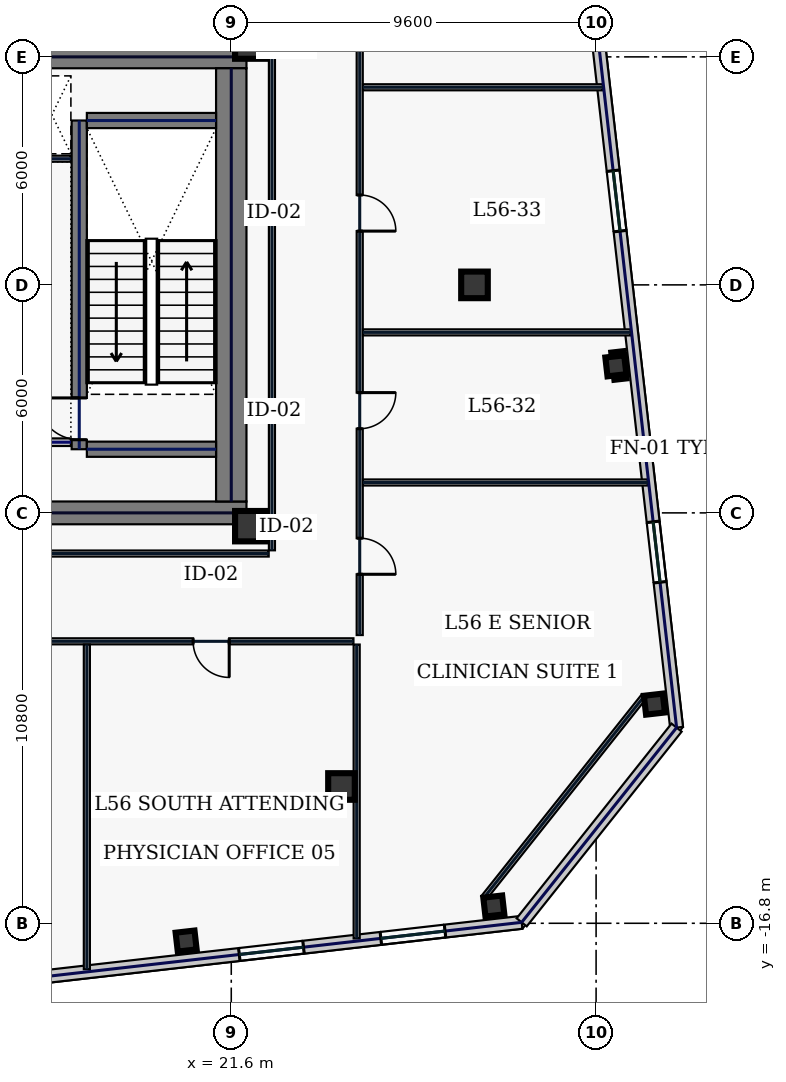
"""IFC4 building model, lengths in metres.
Left out: names, types, materials, properties, quantities, classifications, styles, units other than length and angle.
Written with IfcOpenShell. Run it as: python <this file> out.ifc"""

import sys

from ifc_helpers import new_model, si_unit, direction, frame, frame_2d, origin, origin_2d, place, context, subcontext, project, spatial, rectangle, hollow_rectangle, extrude, element, fill, save


model = new_model("IFC4")
c1 = context("Model", 3, precision=1e-05, world=origin(), true_north=direction((0.0, 1.0)))
c2 = subcontext(c1, "Body", "Model", "MODEL_VIEW")
j1 = project(units=[si_unit("LENGTHUNIT", "METRE"), si_unit("PLANEANGLEUNIT", "RADIAN")], contexts=[c1])
p1 = place(None, origin())
s1 = spatial("IfcSite", under=j1, at=p1, CompositionType="ELEMENT")
p2 = place(p1, origin())
s2 = spatial("IfcBuilding", under=s1, at=p2, CompositionType="ELEMENT")
p3 = place(p2, frame((0.0, 0.0, 243.0)))
s3 = spatial("IfcBuildingStorey", under=s2, at=p3, CompositionType="ELEMENT", Elevation=243.0)
for number, where, z_axis, x_axis in (
    (1, (10.5, 6.0, 0.0), (0.0, 0.0, 1.0), (1.0, 0.0, 0.0)),
    (2, (10.5, -6.0, 0.0), (0.0, 0.0, 1.0), (1.0, 0.0, 0.0)),
):
    element("IfcWall", number, at=place(p3, frame(where, z_axis=z_axis, x_axis=x_axis)), inside=s3, PredefinedType="SHEAR", context=c2, shape_type="SweptSolid", body=[
        extrude(rectangle(XDim=11.5, YDim=0.6, at=frame_2d((5.75, 0.0))), origin(), (0.0, 0.0, 1.0), 3.74),
    ])
p4 = place(p3, frame((21.6, -5.7, 0.0), z_axis=(0.0, 0.0, 1.0), x_axis=(0.0, 1.0, 0.0)))
e3 = element("IfcWall", 3, at=p4, inside=s3, PredefinedType="SHEAR", context=c2, shape_type="SweptSolid", body=[
    extrude(rectangle(XDim=11.4, YDim=0.8, at=frame_2d((5.7, 0.0))), origin(), (0.0, 0.0, 1.0), 3.74),
])
p5 = place(p3, frame((17.6, -4.325, 0.0), z_axis=(0.0, 0.0, 1.0), x_axis=(0.0, 1.0, 0.0)))
e4 = element("IfcWall", 4, at=p5, inside=s3, PredefinedType="SHEAR", context=c2, shape_type="SweptSolid", body=[
    extrude(rectangle(XDim=8.65, YDim=0.4, at=frame_2d((4.325, 0.0))), origin(), (0.0, 0.0, 1.0), 3.74),
])
p6 = place(p5, frame((0.25, 0.0, 0.0)))
e5 = element("IfcOpeningElement", 5, at=p6, cuts=e4, PredefinedType="OPENING", context=c2, shape_type="SweptSolid", body=[
    extrude(rectangle(XDim=1.1, YDim=2.2, at=frame_2d((0.55, 1.1))), frame((0.0, 0.21, 0.0), z_axis=(0.0, -1.0, 0.0), x_axis=(1.0, 0.0, 0.0)), (0.0, 0.0, 1.0), 0.42),
])
for number, where, z_axis, x_axis in (
    (6, (17.8, -4.325, 0.0), (0.0, 0.0, 1.0), (1.0, 0.0, 0.0)),
    (7, (17.8, 4.325, 0.0), (0.0, 0.0, 1.0), (1.0, 0.0, 0.0)),
):
    element("IfcWall", number, at=place(p3, frame(where, z_axis=z_axis, x_axis=x_axis)), inside=s3, PredefinedType="SHEAR", context=c2, shape_type="SweptSolid", body=[
        extrude(rectangle(XDim=3.4, YDim=0.4, at=frame_2d((1.7, 0.0))), origin(), (0.0, 0.0, 1.0), 3.74),
    ])
for number, where, z_axis, x_axis in (
    (8, (22.1, -6.35, 0.0), (0.0, 0.0, 1.0), (1.0, 0.0, 0.0)),
    (9, (22.1, 6.35, 0.0), (0.0, 0.0, 1.0), (1.0, 0.0, 0.0)),
):
    element("IfcColumn", number, at=place(p3, frame(where, z_axis=z_axis, x_axis=x_axis)), inside=s3, PredefinedType="COLUMN", context=c2, shape_type="SweptSolid", body=[
        extrude(hollow_rectangle(XDim=0.8, YDim=0.8, WallThickness=0.036, at=origin_2d()), origin(), (0.0, 0.0, 1.0), 3.74),
    ])
for number, where, z_axis, x_axis in (
    (10, (24.5, -13.2, 0.0), (0.0, 0.0, 1.0), (1.0, 0.0, 0.0)),
    (11, (28.0, 0.0, 0.0), (0.0, 0.0, 1.0), (1.0, 0.0, 0.0)),
):
    element("IfcColumn", number, at=place(p3, frame(where, z_axis=z_axis, x_axis=x_axis)), inside=s3, PredefinedType="COLUMN", context=c2, shape_type="SweptSolid", body=[
        extrude(hollow_rectangle(XDim=0.7, YDim=0.7, WallThickness=0.032, at=origin_2d()), origin(), (0.0, 0.0, 1.0), 3.74),
    ])
for number, where, z_axis, x_axis in (
    (12, (20.412, -17.268, 0.0), (0.0, 0.0, 1.0), (0.994, 0.113, 0.0)),
    (13, (28.509, -16.345, 0.0), (0.0, 0.0, 1.0), (0.994, 0.113, 0.0)),
    (14, (32.734, -11.033, 0.0), (0.0, 0.0, 1.0), (0.994, 0.113, 0.0)),
    (15, (31.72, -2.131, 0.0), (0.0, 0.0, 1.0), (0.994, 0.113, 0.0)),
):
    element("IfcColumn", number, at=place(p3, frame(where, z_axis=z_axis, x_axis=x_axis)), inside=s3, PredefinedType="COLUMN", context=c2, shape_type="SweptSolid", body=[
        extrude(hollow_rectangle(XDim=0.5, YDim=0.5, WallThickness=0.025, at=origin_2d()), origin(), (0.0, 0.0, 1.0), 3.74),
    ])
p7 = place(p3, frame((10.71, -18.886, 0.0), z_axis=(0.0, 0.0, 1.0), x_axis=(0.993572271362, 0.113199565282, 0.0)))
e16 = element("IfcWall", 16, at=p7, inside=s3, PredefinedType="STANDARD", context=c2, shape_type="SweptSolid", body=[
    extrude(rectangle(XDim=18.651, YDim=0.34, at=frame_2d((9.326, 0.0))), origin(), (0.0, 0.0, 1.0), 3.74),
])
p8 = place(p7, frame((3.024, 0.0, 0.88)))
e17 = element("IfcOpeningElement", 17, at=p8, cuts=e16, PredefinedType="OPENING", context=c2, shape_type="SweptSolid", body=[
    extrude(rectangle(XDim=1.7, YDim=1.95, at=frame_2d((0.85, 0.975))), frame((0.0, 0.18, 0.0), z_axis=(0.0, -1.0, 0.0), x_axis=(1.0, 0.0, 0.0)), (0.0, 0.0, 1.0), 0.36),
])
p9 = place(p7, frame((11.173, 0.0, 0.88)))
e18 = element("IfcOpeningElement", 18, at=p9, cuts=e16, PredefinedType="OPENING", context=c2, shape_type="SweptSolid", body=[
    extrude(rectangle(XDim=1.7, YDim=1.95, at=frame_2d((0.85, 0.975))), frame((0.0, 0.18, 0.0), z_axis=(0.0, -1.0, 0.0), x_axis=(1.0, 0.0, 0.0)), (0.0, 0.0, 1.0), 0.36),
])
p10 = place(p7, frame((14.921, 0.0, 0.88)))
e19 = element("IfcOpeningElement", 19, at=p10, cuts=e16, PredefinedType="OPENING", context=c2, shape_type="SweptSolid", body=[
    extrude(rectangle(XDim=1.7, YDim=1.95, at=frame_2d((0.85, 0.975))), frame((0.0, 0.18, 0.0), z_axis=(0.0, -1.0, 0.0), x_axis=(1.0, 0.0, 0.0)), (0.0, 0.0, 1.0), 0.36),
])
p11 = place(p3, frame((33.318, -11.651, 0.0), z_axis=(0.0, 0.0, 1.0), x_axis=(-0.11320360501, 0.9935718111, 0.0)))
e20 = element("IfcWall", 20, at=p11, inside=s3, PredefinedType="STANDARD", context=c2, shape_type="SweptSolid", body=[
    extrude(rectangle(XDim=37.2, YDim=0.34, at=frame_2d((18.6, 0.0))), origin(), (0.0, 0.0, 1.0), 3.74),
])
p12 = place(p11, frame((3.85, 0.0, 0.58)))
e21 = element("IfcOpeningElement", 21, at=p12, cuts=e20, PredefinedType="OPENING", context=c2, shape_type="SweptSolid", body=[
    extrude(rectangle(XDim=1.6, YDim=2.3, at=frame_2d((0.8, 1.15))), frame((0.0, 0.18, 0.0), z_axis=(0.0, -1.0, 0.0), x_axis=(1.0, 0.0, 0.0)), (0.0, 0.0, 1.0), 0.36),
])
p13 = place(p11, frame((13.15, 0.0, 0.58)))
e22 = element("IfcOpeningElement", 22, at=p13, cuts=e20, PredefinedType="OPENING", context=c2, shape_type="SweptSolid", body=[
    extrude(rectangle(XDim=1.6, YDim=2.3, at=frame_2d((0.8, 1.15))), frame((0.0, 0.18, 0.0), z_axis=(0.0, -1.0, 0.0), x_axis=(1.0, 0.0, 0.0)), (0.0, 0.0, 1.0), 0.36),
])
p14 = place(p11, frame((22.45, 0.0, 0.58)))
e23 = element("IfcOpeningElement", 23, at=p14, cuts=e20, PredefinedType="OPENING", context=c2, shape_type="SweptSolid", body=[
    extrude(rectangle(XDim=1.6, YDim=2.3, at=frame_2d((0.8, 1.15))), frame((0.0, 0.18, 0.0), z_axis=(0.0, -1.0, 0.0), x_axis=(1.0, 0.0, 0.0)), (0.0, 0.0, 1.0), 0.36),
])
p15 = place(p11, frame((31.75, 0.0, 0.58)))
e24 = element("IfcOpeningElement", 24, at=p15, cuts=e20, PredefinedType="OPENING", context=c2, shape_type="SweptSolid", body=[
    extrude(rectangle(XDim=1.6, YDim=2.3, at=frame_2d((0.8, 1.15))), frame((0.0, 0.18, 0.0), z_axis=(0.0, -1.0, 0.0), x_axis=(1.0, 0.0, 0.0)), (0.0, 0.0, 1.0), 0.36),
])
p16 = place(p3, frame((29.242, -16.775, 0.0), z_axis=(0.0, 0.0, 1.0), x_axis=(0.62252823689, 0.78259733853, 0.0)))
e25 = element("IfcWall", 25, at=p16, inside=s3, PredefinedType="STANDARD", context=c2, shape_type="SweptSolid", body=[
    extrude(rectangle(XDim=6.548, YDim=0.34, at=frame_2d((3.274, 0.0))), origin(), (0.0, 0.0, 1.0), 3.74),
])
p17 = place(p3, frame((15.725, 3.32, 0.0), z_axis=(0.0, 0.0, 1.0), x_axis=(1.0, 0.0, 0.0)))
e26 = element("IfcWall", 26, at=p17, inside=s3, PredefinedType="PARTITIONING", context=c2, shape_type="SweptSolid", body=[
    extrude(rectangle(XDim=1.655, YDim=0.16, at=frame_2d((0.827, 0.0))), origin(), (0.0, 0.0, 1.0), 3.74),
])
p18 = place(p3, frame((14.825, -4.14, 0.0), z_axis=(0.0, 0.0, 1.0), x_axis=(1.0, 0.0, 0.0)))
e27 = element("IfcWall", 27, at=p18, inside=s3, PredefinedType="SOLIDWALL", context=c2, shape_type="SweptSolid", body=[
    extrude(rectangle(XDim=2.555, YDim=0.2, at=frame_2d((1.277, 0.0))), origin(), (0.0, 0.0, 1.0), 3.74),
])
p19 = place(p18, frame((0.88, 0.0, 0.0)))
e28 = element("IfcOpeningElement", 28, at=p19, cuts=e27, PredefinedType="OPENING", context=c2, shape_type="SweptSolid", body=[
    extrude(rectangle(XDim=0.95, YDim=2.2, at=frame_2d((0.475, 1.1))), frame((0.0, 0.11, 0.0), z_axis=(0.0, -1.0, 0.0), x_axis=(1.0, 0.0, 0.0)), (0.0, 0.0, 1.0), 0.22),
])
p20 = place(p3, frame((28.242, -16.134, 0.0), z_axis=(0.0, 0.0, 1.0), x_axis=(0.622521563328, 0.782602647064, 0.0)))
e29 = element("IfcWall", 29, at=p20, inside=s3, PredefinedType="PARTITIONING", context=c2, shape_type="SweptSolid", body=[
    extrude(rectangle(XDim=6.788, YDim=0.16, at=frame_2d((3.394, 0.0))), origin(), (0.0, 0.0, 1.0), 3.74),
])
p21 = place(p3, frame((24.98, 9.415, 0.0), z_axis=(0.0, 0.0, 1.0), x_axis=(0.0, -1.0, 0.0)))
e30 = element("IfcWall", 30, at=p21, inside=s3, PredefinedType="PARTITIONING", context=c2, shape_type="SweptSolid", body=[
    extrude(rectangle(XDim=18.63, YDim=0.16, at=frame_2d((9.315, 0.0))), origin(), (0.0, 0.0, 1.0), 3.74),
])
p22 = place(p21, frame((16.081, 0.0, 0.0)))
e31 = element("IfcOpeningElement", 31, at=p22, cuts=e30, PredefinedType="OPENING", context=c2, shape_type="SweptSolid", body=[
    extrude(rectangle(XDim=0.95, YDim=2.2, at=frame_2d((0.475, 1.1))), frame((0.0, 0.09, 0.0), z_axis=(0.0, -1.0, 0.0), x_axis=(1.0, 0.0, 0.0)), (0.0, 0.0, 1.0), 0.18),
])
p23 = place(p21, frame((12.25, 0.0, 0.0)))
e32 = element("IfcOpeningElement", 32, at=p23, cuts=e30, PredefinedType="OPENING", context=c2, shape_type="SweptSolid", body=[
    extrude(rectangle(XDim=0.95, YDim=2.2, at=frame_2d((0.475, 1.1))), frame((0.0, 0.09, 0.0), z_axis=(0.0, -1.0, 0.0), x_axis=(1.0, 0.0, 0.0)), (0.0, 0.0, 1.0), 0.18),
])
p24 = place(p21, frame((7.05, 0.0, 0.0)))
e33 = element("IfcOpeningElement", 33, at=p24, cuts=e30, PredefinedType="OPENING", context=c2, shape_type="SweptSolid", body=[
    extrude(rectangle(XDim=0.95, YDim=2.2, at=frame_2d((0.475, 1.1))), frame((0.0, 0.09, 0.0), z_axis=(0.0, -1.0, 0.0), x_axis=(1.0, 0.0, 0.0)), (0.0, 0.0, 1.0), 0.18),
])
p25 = place(p21, frame((1.869, 0.0, 0.0)))
e34 = element("IfcOpeningElement", 34, at=p25, cuts=e30, PredefinedType="OPENING", context=c2, shape_type="SweptSolid", body=[
    extrude(rectangle(XDim=0.95, YDim=2.2, at=frame_2d((0.475, 1.1))), frame((0.0, 0.09, 0.0), z_axis=(0.0, -1.0, 0.0), x_axis=(1.0, 0.0, 0.0)), (0.0, 0.0, 1.0), 0.18),
])
p26 = place(p3, frame((24.815, -9.38, 0.0), z_axis=(0.0, 0.0, 1.0), x_axis=(-1.0, 0.0, 0.0)))
e35 = element("IfcWall", 35, at=p26, inside=s3, PredefinedType="PARTITIONING", context=c2, shape_type="SweptSolid", body=[
    extrude(rectangle(XDim=37.35, YDim=0.16, at=frame_2d((18.675, 0.0))), origin(), (0.0, 0.0, 1.0), 3.74),
])
p27 = place(p26, frame((29.535, 0.0, 0.0)))
e36 = element("IfcOpeningElement", 36, at=p27, cuts=e35, PredefinedType="OPENING", context=c2, shape_type="SweptSolid", body=[
    extrude(rectangle(XDim=0.95, YDim=2.2, at=frame_2d((0.475, 1.1))), frame((0.0, 0.09, 0.0), z_axis=(0.0, -1.0, 0.0), x_axis=(1.0, 0.0, 0.0)), (0.0, 0.0, 1.0), 0.18),
])
p28 = place(p26, frame((22.435, 0.0, 0.0)))
e37 = element("IfcOpeningElement", 37, at=p28, cuts=e35, PredefinedType="OPENING", context=c2, shape_type="SweptSolid", body=[
    extrude(rectangle(XDim=0.95, YDim=2.2, at=frame_2d((0.475, 1.1))), frame((0.0, 0.09, 0.0), z_axis=(0.0, -1.0, 0.0), x_axis=(1.0, 0.0, 0.0)), (0.0, 0.0, 1.0), 0.18),
])
p29 = place(p26, frame((13.025, 0.0, 0.0)))
e38 = element("IfcOpeningElement", 38, at=p29, cuts=e35, PredefinedType="OPENING", context=c2, shape_type="SweptSolid", body=[
    extrude(rectangle(XDim=1.05, YDim=2.2, at=frame_2d((0.525, 1.1))), frame((0.0, 0.09, 0.0), z_axis=(0.0, -1.0, 0.0), x_axis=(1.0, 0.0, 0.0)), (0.0, 0.0, 1.0), 0.18),
])
p30 = place(p26, frame((3.269, 0.0, 0.0)))
e39 = element("IfcOpeningElement", 39, at=p30, cuts=e35, PredefinedType="OPENING", context=c2, shape_type="SweptSolid", body=[
    extrude(rectangle(XDim=0.95, YDim=2.2, at=frame_2d((0.475, 1.1))), frame((0.0, 0.09, 0.0), z_axis=(0.0, -1.0, 0.0), x_axis=(1.0, 0.0, 0.0)), (0.0, 0.0, 1.0), 0.18),
])
p31 = place(p3, frame((10.715, -7.07, 0.0), z_axis=(0.0, 0.0, 1.0), x_axis=(1.0, 0.0, 0.0)))
e40 = element("IfcWall", 40, at=p31, inside=s3, PredefinedType="PARTITIONING", context=c2, shape_type="SweptSolid", body=[
    extrude(rectangle(XDim=11.87, YDim=0.16, at=frame_2d((5.935, 0.0))), origin(), (0.0, 0.0, 1.0), 3.74),
])
p32 = place(p3, frame((22.67, -6.985, 0.0), z_axis=(0.0, 0.0, 1.0), x_axis=(0.0, 1.0, 0.0)))
e41 = element("IfcWall", 41, at=p32, inside=s3, PredefinedType="PARTITIONING", context=c2, shape_type="SweptSolid", body=[
    extrude(rectangle(XDim=14.17, YDim=0.16, at=frame_2d((7.085, 0.0))), origin(), (0.0, 0.0, 1.0), 3.74),
])
p33 = place(p3, frame((24.9, -17.199, 0.0), z_axis=(0.0, 0.0, 1.0), x_axis=(0.0, 1.0, 0.0)))
e42 = element("IfcWall", 42, at=p33, inside=s3, PredefinedType="PARTITIONING", context=c2, shape_type="SweptSolid", body=[
    extrude(rectangle(XDim=7.734, YDim=0.16, at=frame_2d((3.867, 0.0))), origin(), (0.0, 0.0, 1.0), 3.74),
])
p34 = place(p3, frame((17.8, -18.008, 0.0), z_axis=(0.0, 0.0, 1.0), x_axis=(0.0, 1.0, 0.0)))
e43 = element("IfcWall", 43, at=p34, inside=s3, PredefinedType="PARTITIONING", context=c2, shape_type="SweptSolid", body=[
    extrude(rectangle(XDim=8.543, YDim=0.16, at=frame_2d((4.271, 0.0))), origin(), (0.0, 0.0, 1.0), 3.74),
])
p35 = place(p3, frame((25.065, -5.2, 0.0), z_axis=(0.0, 0.0, 1.0), x_axis=(1.0, 0.0, 0.0)))
e44 = element("IfcWall", 44, at=p35, inside=s3, PredefinedType="PARTITIONING", context=c2, shape_type="SweptSolid", body=[
    extrude(rectangle(XDim=7.498, YDim=0.16, at=frame_2d((3.749, 0.0))), origin(), (0.0, 0.0, 1.0), 3.74),
])
p36 = place(p3, frame((25.065, -1.25, 0.0), z_axis=(0.0, 0.0, 1.0), x_axis=(1.0, 0.0, 0.0)))
e45 = element("IfcWall", 45, at=p36, inside=s3, PredefinedType="PARTITIONING", context=c2, shape_type="SweptSolid", body=[
    extrude(rectangle(XDim=7.048, YDim=0.16, at=frame_2d((3.524, 0.0))), origin(), (0.0, 0.0, 1.0), 3.74),
])
p37 = place(p3, frame((25.065, 5.2, 0.0), z_axis=(0.0, 0.0, 1.0), x_axis=(1.0, 0.0, 0.0)))
e46 = element("IfcWall", 46, at=p37, inside=s3, PredefinedType="PARTITIONING", context=c2, shape_type="SweptSolid", body=[
    extrude(rectangle(XDim=6.313, YDim=0.16, at=frame_2d((3.157, 0.0))), origin(), (0.0, 0.0, 1.0), 3.74),
])
p38 = place(p9, origin())
e47 = element("IfcWindow", 47, at=p38, inside=s3, PartitioningType="SINGLE_PANEL", PredefinedType="WINDOW", context=c2, shape_type="SweptSolid", body=[
    extrude(rectangle(XDim=1.7, YDim=1.95, at=frame_2d((0.85, 0.975))), frame((0.0, 0.03, 0.0), z_axis=(0.0, -1.0, 0.0), x_axis=(1.0, 0.0, 0.0)), (0.0, 0.0, 1.0), 0.06),
])
fill(e18, e47)
p39 = place(p10, origin())
e48 = element("IfcWindow", 48, at=p39, inside=s3, PartitioningType="SINGLE_PANEL", PredefinedType="WINDOW", context=c2, shape_type="SweptSolid", body=[
    extrude(rectangle(XDim=1.7, YDim=1.95, at=frame_2d((0.85, 0.975))), frame((0.0, 0.03, 0.0), z_axis=(0.0, -1.0, 0.0), x_axis=(1.0, 0.0, 0.0)), (0.0, 0.0, 1.0), 0.06),
])
fill(e19, e48)
p40 = place(p12, origin())
e49 = element("IfcWindow", 49, at=p40, inside=s3, PartitioningType="SINGLE_PANEL", PredefinedType="WINDOW", context=c2, shape_type="SweptSolid", body=[
    extrude(rectangle(XDim=1.6, YDim=2.3, at=frame_2d((0.8, 1.15))), frame((0.0, 0.03, 0.0), z_axis=(0.0, -1.0, 0.0), x_axis=(1.0, 0.0, 0.0)), (0.0, 0.0, 1.0), 0.06),
])
fill(e21, e49)
p41 = place(p13, origin())
e50 = element("IfcWindow", 50, at=p41, inside=s3, PartitioningType="SINGLE_PANEL", PredefinedType="WINDOW", context=c2, shape_type="SweptSolid", body=[
    extrude(rectangle(XDim=1.6, YDim=2.3, at=frame_2d((0.8, 1.15))), frame((0.0, 0.03, 0.0), z_axis=(0.0, -1.0, 0.0), x_axis=(1.0, 0.0, 0.0)), (0.0, 0.0, 1.0), 0.06),
])
fill(e22, e50)
p42 = place(p6, origin())
e51 = element("IfcDoor", 51, at=p42, inside=s3, OperationType="SINGLE_SWING_RIGHT", PredefinedType="DOOR", context=c2, shape_type="SweptSolid", body=[
    extrude(rectangle(XDim=1.1, YDim=2.2, at=frame_2d((0.55, 1.1))), frame((0.0, 0.025, 0.0), z_axis=(0.0, -1.0, 0.0), x_axis=(1.0, 0.0, 0.0)), (0.0, 0.0, 1.0), 0.05),
])
fill(e5, e51)
p43 = place(p30, origin())
e52 = element("IfcDoor", 52, at=p43, inside=s3, OperationType="SINGLE_SWING_LEFT", PredefinedType="DOOR", context=c2, shape_type="SweptSolid", body=[
    extrude(rectangle(XDim=0.95, YDim=2.2, at=frame_2d((0.475, 1.1))), frame((0.0, 0.025, 0.0), z_axis=(0.0, -1.0, 0.0), x_axis=(1.0, 0.0, 0.0)), (0.0, 0.0, 1.0), 0.05),
])
fill(e39, e52)
p44 = place(p22, origin())
e53 = element("IfcDoor", 53, at=p44, inside=s3, OperationType="SINGLE_SWING_RIGHT", PredefinedType="DOOR", context=c2, shape_type="SweptSolid", body=[
    extrude(rectangle(XDim=0.95, YDim=2.2, at=frame_2d((0.475, 1.1))), frame((0.0, 0.025, 0.0), z_axis=(0.0, -1.0, 0.0), x_axis=(1.0, 0.0, 0.0)), (0.0, 0.0, 1.0), 0.05),
])
fill(e31, e53)
p45 = place(p23, origin())
e54 = element("IfcDoor", 54, at=p45, inside=s3, OperationType="SINGLE_SWING_LEFT", PredefinedType="DOOR", context=c2, shape_type="SweptSolid", body=[
    extrude(rectangle(XDim=0.95, YDim=2.2, at=frame_2d((0.475, 1.1))), frame((0.0, 0.025, 0.0), z_axis=(0.0, -1.0, 0.0), x_axis=(1.0, 0.0, 0.0)), (0.0, 0.0, 1.0), 0.05),
])
fill(e32, e54)
p46 = place(p24, origin())
e55 = element("IfcDoor", 55, at=p46, inside=s3, OperationType="SINGLE_SWING_RIGHT", PredefinedType="DOOR", context=c2, shape_type="SweptSolid", body=[
    extrude(rectangle(XDim=0.95, YDim=2.2, at=frame_2d((0.475, 1.1))), frame((0.0, 0.025, 0.0), z_axis=(0.0, -1.0, 0.0), x_axis=(1.0, 0.0, 0.0)), (0.0, 0.0, 1.0), 0.05),
])
fill(e33, e55)
save(model, sys.argv[1])
